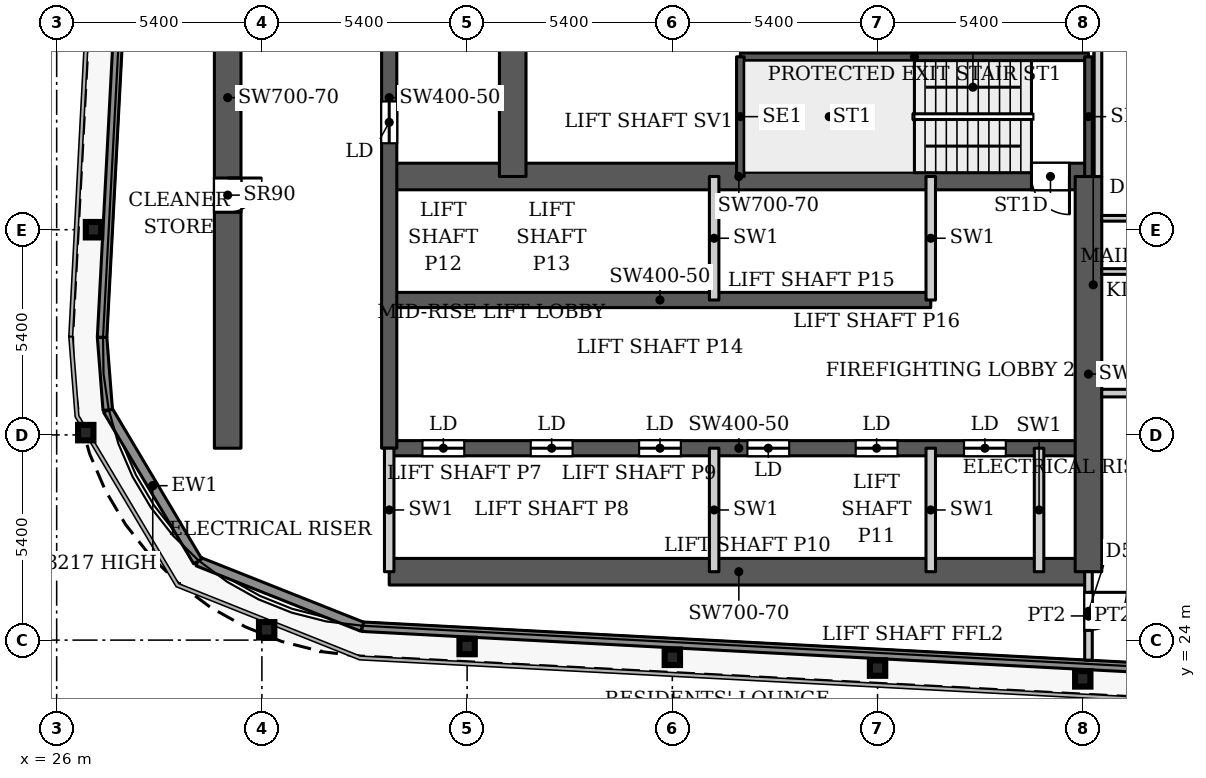
"""IFC4 building model, lengths in metres.
Left out: names, types, materials, properties, quantities, classifications, styles, units other than length and angle.
Written with IfcOpenShell. Run it as: python <this file> out.ifc"""

import sys

from ifc_helpers import new_model, si_unit, direction, frame, frame_2d, origin, origin_2d, place, context, subcontext, project, spatial, rectangle, i_section, extrude, source, transform, mapped, element, fill, save


model = new_model("IFC4")
c1 = context("Model", 3, precision=1e-05, world=origin(), true_north=direction((0.0, 1.0)))
c2 = subcontext(c1, "Body", "Model", "MODEL_VIEW")
j1 = project(units=[si_unit("LENGTHUNIT", "METRE"), si_unit("PLANEANGLEUNIT", "RADIAN")], contexts=[c1])
p1 = place(None, origin())
s1 = spatial("IfcSite", under=j1, at=p1, CompositionType="ELEMENT")
p2 = place(p1, origin())
s2 = spatial("IfcBuilding", under=s1, at=p2, CompositionType="ELEMENT")
p3 = place(p2, frame((0.0, 0.0, 220.1)))
s3 = spatial("IfcBuildingStorey", under=s2, at=p3, CompositionType="ELEMENT", Elevation=220.1)
for number, where, z_axis, x_axis in (
    (1, (53.0, 22.98, 0.0), (0.0, 0.0, 1.0), (1.0, 0.0, 0.0)),
    (2, (47.6, 23.264, 0.0), (0.0, 0.0, 1.0), (1.0, 0.0, 0.0)),
    (3, (42.2, 23.548, 0.0), (0.0, 0.0, 1.0), (1.0, 0.0, 0.0)),
    (4, (36.8, 23.832, 0.0), (0.0, 0.0, 1.0), (1.0, 0.0, 0.0)),
    (5, (31.526, 24.271, 0.0), (0.0, 0.0, 1.0), (1.0, 0.0, 0.0)),
    (6, (26.765, 29.46, 0.0), (0.0, 0.0, 1.0), (1.0, 0.0, 0.0)),
    (7, (26.969, 34.8, 0.0), (0.0, 0.0, 1.0), (1.0, 0.0, 0.0)),
):
    element("IfcColumn", number, at=place(p3, frame(where, z_axis=z_axis, x_axis=x_axis)), inside=s3, PredefinedType="COLUMN", context=c2, shape_type="SweptSolid", body=[
        extrude(i_section(OverallWidth=0.404, OverallDepth=0.407, WebThickness=0.027, FlangeThickness=0.044, FilletRadius=0.012, at=origin_2d()), origin(), (0.0, 0.0, 1.0), 3.9),
    ])
p4 = place(p3, frame((34.75, 25.8, 0.0), z_axis=(0.0, 0.0, 1.0), x_axis=(1.0, 0.0, 0.0)))
e8 = element("IfcWall", 8, at=p4, inside=s3, PredefinedType="SHEAR", context=c2, shape_type="SweptSolid", body=[
    extrude(rectangle(XDim=18.4, YDim=0.7, at=frame_2d((9.2, 0.0))), origin(), (0.0, 0.0, 1.0), 3.9),
])
p5 = place(p3, frame((34.75, 29.05, 0.0), z_axis=(0.0, 0.0, 1.0), x_axis=(1.0, 0.0, 0.0)))
e9 = element("IfcWall", 9, at=p5, inside=s3, PredefinedType="SHEAR", context=c2, shape_type="SweptSolid", body=[
    extrude(rectangle(XDim=18.4, YDim=0.4, at=frame_2d((9.2, 0.0))), origin(), (0.0, 0.0, 1.0), 3.9),
])
p6 = place(p5, frame((0.875, 0.0, 0.0)))
e10 = element("IfcOpeningElement", 10, at=p6, cuts=e9, PredefinedType="OPENING", context=c2, shape_type="SweptSolid", body=[
    extrude(rectangle(XDim=1.1, YDim=2.2, at=frame_2d((0.55, 1.1))), frame((0.0, 0.21, 0.0), z_axis=(0.0, -1.0, 0.0), x_axis=(1.0, 0.0, 0.0)), (0.0, 0.0, 1.0), 0.42),
])
p7 = place(p5, frame((3.725, 0.0, 0.0)))
e11 = element("IfcOpeningElement", 11, at=p7, cuts=e9, PredefinedType="OPENING", context=c2, shape_type="SweptSolid", body=[
    extrude(rectangle(XDim=1.1, YDim=2.2, at=frame_2d((0.55, 1.1))), frame((0.0, 0.21, 0.0), z_axis=(0.0, -1.0, 0.0), x_axis=(1.0, 0.0, 0.0)), (0.0, 0.0, 1.0), 0.42),
])
p8 = place(p5, frame((6.575, 0.0, 0.0)))
e12 = element("IfcOpeningElement", 12, at=p8, cuts=e9, PredefinedType="OPENING", context=c2, shape_type="SweptSolid", body=[
    extrude(rectangle(XDim=1.1, YDim=2.2, at=frame_2d((0.55, 1.1))), frame((0.0, 0.21, 0.0), z_axis=(0.0, -1.0, 0.0), x_axis=(1.0, 0.0, 0.0)), (0.0, 0.0, 1.0), 0.42),
])
p9 = place(p5, frame((9.425, 0.0, 0.0)))
e13 = element("IfcOpeningElement", 13, at=p9, cuts=e9, PredefinedType="OPENING", context=c2, shape_type="SweptSolid", body=[
    extrude(rectangle(XDim=1.1, YDim=2.2, at=frame_2d((0.55, 1.1))), frame((0.0, 0.21, 0.0), z_axis=(0.0, -1.0, 0.0), x_axis=(1.0, 0.0, 0.0)), (0.0, 0.0, 1.0), 0.42),
])
p10 = place(p5, frame((12.275, 0.0, 0.0)))
e14 = element("IfcOpeningElement", 14, at=p10, cuts=e9, PredefinedType="OPENING", context=c2, shape_type="SweptSolid", body=[
    extrude(rectangle(XDim=1.1, YDim=2.2, at=frame_2d((0.55, 1.1))), frame((0.0, 0.21, 0.0), z_axis=(0.0, -1.0, 0.0), x_axis=(1.0, 0.0, 0.0)), (0.0, 0.0, 1.0), 0.42),
])
p11 = place(p5, frame((15.125, 0.0, 0.0)))
e15 = element("IfcOpeningElement", 15, at=p11, cuts=e9, PredefinedType="OPENING", context=c2, shape_type="SweptSolid", body=[
    extrude(rectangle(XDim=1.1, YDim=2.2, at=frame_2d((0.55, 1.1))), frame((0.0, 0.21, 0.0), z_axis=(0.0, -1.0, 0.0), x_axis=(1.0, 0.0, 0.0)), (0.0, 0.0, 1.0), 0.42),
])
p12 = place(p3, frame((34.75, 32.95, 0.0), z_axis=(0.0, 0.0, 1.0), x_axis=(1.0, 0.0, 0.0)))
e16 = element("IfcWall", 16, at=p12, inside=s3, PredefinedType="SHEAR", context=c2, shape_type="SweptSolid", body=[
    extrude(rectangle(XDim=14.25, YDim=0.4, at=frame_2d((7.125, 0.0))), origin(), (0.0, 0.0, 1.0), 3.9),
])
p13 = place(p3, frame((34.75, 36.2, 0.0), z_axis=(0.0, 0.0, 1.0), x_axis=(1.0, 0.0, 0.0)))
e17 = element("IfcWall", 17, at=p13, inside=s3, PredefinedType="SHEAR", context=c2, shape_type="SweptSolid", body=[
    extrude(rectangle(XDim=18.4, YDim=0.7, at=frame_2d((9.2, 0.0))), origin(), (0.0, 0.0, 1.0), 3.9),
])
p14 = place(p13, frame((16.9, 0.0, 0.0)))
e18 = element("IfcOpeningElement", 18, at=p14, cuts=e17, PredefinedType="OPENING", context=c2, shape_type="SweptSolid", body=[
    extrude(rectangle(XDim=1.0, YDim=2.2, at=frame_2d((0.5, 1.1))), frame((0.0, 0.36, 0.0), z_axis=(0.0, -1.0, 0.0), x_axis=(1.0, 0.0, 0.0)), (0.0, 0.0, 1.0), 0.72),
])
p15 = place(p3, frame((34.75, 29.05, 0.0), z_axis=(0.0, 0.0, 1.0), x_axis=(0.0, 1.0, 0.0)))
e19 = element("IfcWall", 19, at=p15, inside=s3, PredefinedType="SHEAR", context=c2, shape_type="SweptSolid", body=[
    extrude(rectangle(XDim=18.45, YDim=0.4, at=frame_2d((9.225, 0.0))), origin(), (0.0, 0.0, 1.0), 3.9),
])
p16 = place(p15, frame((8.025, 0.0, 0.0)))
e20 = element("IfcOpeningElement", 20, at=p16, cuts=e19, PredefinedType="OPENING", context=c2, shape_type="SweptSolid", body=[
    extrude(rectangle(XDim=1.1, YDim=2.2, at=frame_2d((0.55, 1.1))), frame((0.0, 0.21, 0.0), z_axis=(0.0, -1.0, 0.0), x_axis=(1.0, 0.0, 0.0)), (0.0, 0.0, 1.0), 0.42),
])
p17 = place(p15, frame((10.875, 0.0, 0.0)))
e21 = element("IfcOpeningElement", 21, at=p17, cuts=e19, PredefinedType="OPENING", context=c2, shape_type="SweptSolid", body=[
    extrude(rectangle(XDim=1.1, YDim=2.2, at=frame_2d((0.55, 1.1))), frame((0.0, 0.21, 0.0), z_axis=(0.0, -1.0, 0.0), x_axis=(1.0, 0.0, 0.0)), (0.0, 0.0, 1.0), 0.42),
])
p18 = place(p15, frame((13.725, 0.0, 0.0)))
e22 = element("IfcOpeningElement", 22, at=p18, cuts=e19, PredefinedType="OPENING", context=c2, shape_type="SweptSolid", body=[
    extrude(rectangle(XDim=1.1, YDim=2.2, at=frame_2d((0.55, 1.1))), frame((0.0, 0.21, 0.0), z_axis=(0.0, -1.0, 0.0), x_axis=(1.0, 0.0, 0.0)), (0.0, 0.0, 1.0), 0.42),
])
p19 = place(p15, frame((15.95, 0.0, 0.0)))
e23 = element("IfcOpeningElement", 23, at=p19, cuts=e19, PredefinedType="OPENING", context=c2, shape_type="SweptSolid", body=[
    extrude(rectangle(XDim=1.1, YDim=2.2, at=frame_2d((0.55, 1.1))), frame((0.0, 0.21, 0.0), z_axis=(0.0, -1.0, 0.0), x_axis=(1.0, 0.0, 0.0)), (0.0, 0.0, 1.0), 0.42),
])
p20 = place(p3, frame((38.0, 36.2, 0.0), z_axis=(0.0, 0.0, 1.0), x_axis=(0.0, 1.0, 0.0)))
e24 = element("IfcWall", 24, at=p20, inside=s3, PredefinedType="SHEAR", context=c2, shape_type="SweptSolid", body=[
    extrude(rectangle(XDim=8.55, YDim=0.7, at=frame_2d((4.275, 0.0))), origin(), (0.0, 0.0, 1.0), 3.9),
])
p21 = place(p3, frame((30.5, 29.05, 0.0), z_axis=(0.0, 0.0, 1.0), x_axis=(0.0, 1.0, 0.0)))
e25 = element("IfcWall", 25, at=p21, inside=s3, PredefinedType="SHEAR", context=c2, shape_type="SweptSolid", body=[
    extrude(rectangle(XDim=18.45, YDim=0.7, at=frame_2d((9.225, 0.0))), origin(), (0.0, 0.0, 1.0), 3.9),
])
p22 = place(p21, frame((6.21, 0.0, 0.0)))
e26 = element("IfcOpeningElement", 26, at=p22, cuts=e25, PredefinedType="OPENING", context=c2, shape_type="SweptSolid", body=[
    extrude(rectangle(XDim=0.9, YDim=2.2, at=frame_2d((0.45, 1.1))), frame((0.0, 0.36, 0.0), z_axis=(0.0, -1.0, 0.0), x_axis=(1.0, 0.0, 0.0)), (0.0, 0.0, 1.0), 0.72),
])
p23 = place(p21, frame((10.684, 0.0, 0.0)))
e27 = element("IfcOpeningElement", 27, at=p23, cuts=e25, PredefinedType="OPENING", context=c2, shape_type="SweptSolid", body=[
    extrude(rectangle(XDim=0.9, YDim=2.2, at=frame_2d((0.45, 1.1))), frame((0.0, 0.36, 0.0), z_axis=(0.0, -1.0, 0.0), x_axis=(1.0, 0.0, 0.0)), (0.0, 0.0, 1.0), 0.72),
])
p24 = place(p3, frame((53.15, 25.8, 0.0), z_axis=(0.0, 0.0, 1.0), x_axis=(0.0, 1.0, 0.0)))
e28 = element("IfcWall", 28, at=p24, inside=s3, PredefinedType="SHEAR", context=c2, shape_type="SweptSolid", body=[
    extrude(rectangle(XDim=10.4, YDim=0.7, at=frame_2d((5.2, 0.0))), origin(), (0.0, 0.0, 1.0), 3.9),
])
p25 = place(p3, frame((84.386, 21.703, 0.0), z_axis=(0.0, 0.0, 1.0), x_axis=(-0.998617508267, 0.05256493302, 0.0)))
e29 = element("IfcWall", 29, at=p25, inside=s3, PredefinedType="SOLIDWALL", context=c2, shape_type="SweptSolid", body=[
    extrude(rectangle(XDim=50.417, YDim=0.25, at=frame_2d((25.208, 0.0))), origin(), (0.0, 0.0, 1.0), 3.75),
])
p26 = place(p3, frame((34.039, 24.353, 0.0), z_axis=(0.0, 0.0, 1.0), x_axis=(-0.929352825399, 0.369192803184, 0.0)))
e30 = element("IfcWall", 30, at=p26, inside=s3, PredefinedType="SOLIDWALL", context=c2, shape_type="SweptSolid", body=[
    extrude(rectangle(XDim=4.656, YDim=0.25, at=frame_2d((2.328, 0.0))), origin(), (0.0, 0.0, 1.0), 3.75),
])
p27 = place(p3, frame((29.712, 26.072, 0.0), z_axis=(0.0, 0.0, 1.0), x_axis=(-0.511028049012, 0.859564036662, 0.0)))
e31 = element("IfcWall", 31, at=p27, inside=s3, PredefinedType="SOLIDWALL", context=c2, shape_type="SweptSolid", body=[
    extrude(rectangle(XDim=4.634, YDim=0.25, at=frame_2d((2.317, 0.0))), origin(), (0.0, 0.0, 1.0), 3.217),
])
p28 = place(p3, frame((27.344, 30.055, 0.0), z_axis=(0.0, 0.0, 1.0), x_axis=(-0.077571675317, 0.99698677784, 0.0)))
e32 = element("IfcWall", 32, at=p28, inside=s3, PredefinedType="SOLIDWALL", context=c2, shape_type="SweptSolid", body=[
    extrude(rectangle(XDim=1.92, YDim=0.25, at=frame_2d((0.96, 0.0))), origin(), (0.0, 0.0, 1.0), 3.75),
])
p29 = place(p3, frame((27.195, 31.969, 0.0), z_axis=(0.0, 0.0, 1.0), x_axis=(0.052559748861, 0.998617781135, 0.0)))
e33 = element("IfcWall", 33, at=p29, inside=s3, PredefinedType="SOLIDWALL", context=c2, shape_type="SweptSolid", body=[
    extrude(rectangle(XDim=55.972, YDim=0.25, at=frame_2d((27.986, 0.0))), origin(), (0.0, 0.0, 1.0), 3.75),
])
p30 = place(p3, frame((43.99, 39.35, 0.0), z_axis=(0.0, 0.0, 1.0), x_axis=(1.0, 0.0, 0.0)))
e34 = element("IfcWall", 34, at=p30, inside=s3, PredefinedType="SHEAR", context=c2, shape_type="SweptSolid", body=[
    extrude(rectangle(XDim=9.16, YDim=0.2, at=frame_2d((4.58, 0.0))), origin(), (0.0, 0.0, 1.0), 3.9),
])
for number, where, z_axis, x_axis in (
    (35, (43.99, 36.2, 0.0), (0.0, 0.0, 1.0), (0.0, 1.0, 0.0)),
    (36, (53.15, 36.2, 0.0), (0.0, 0.0, 1.0), (0.0, 1.0, 0.0)),
):
    element("IfcWall", number, at=place(p3, frame(where, z_axis=z_axis, x_axis=x_axis)), inside=s3, PredefinedType="SHEAR", context=c2, shape_type="SweptSolid", body=[
        extrude(rectangle(XDim=3.15, YDim=0.2, at=frame_2d((1.575, 0.0))), origin(), (0.0, 0.0, 1.0), 3.9),
    ])
for number, where, z_axis, x_axis in (
    (37, (34.75, 25.8, 0.0), (0.0, 0.0, 1.0), (0.0, 1.0, 0.0)),
    (38, (43.3, 25.8, 0.0), (0.0, 0.0, 1.0), (0.0, 1.0, 0.0)),
    (39, (43.3, 32.95, 0.0), (0.0, 0.0, 1.0), (0.0, 1.0, 0.0)),
    (40, (49.0, 25.8, 0.0), (0.0, 0.0, 1.0), (0.0, 1.0, 0.0)),
    (41, (49.0, 32.95, 0.0), (0.0, 0.0, 1.0), (0.0, 1.0, 0.0)),
    (42, (51.85, 25.8, 0.0), (0.0, 0.0, 1.0), (0.0, 1.0, 0.0)),
):
    element("IfcWall", number, at=place(p3, frame(where, z_axis=z_axis, x_axis=x_axis)), inside=s3, PredefinedType="PARTITIONING", context=c2, shape_type="SweptSolid", body=[
        extrude(rectangle(XDim=3.25, YDim=0.25, at=frame_2d((1.625, 0.0))), origin(), (0.0, 0.0, 1.0), 3.9),
    ])
p31 = place(p3, frame((53.15, 23.472, 0.0), z_axis=(0.0, 0.0, 1.0), x_axis=(0.0, 1.0, 0.0)))
e43 = element("IfcWall", 43, at=p31, inside=s3, PredefinedType="PARTITIONING", context=c2, shape_type="SweptSolid", body=[
    extrude(rectangle(XDim=2.328, YDim=0.2, at=frame_2d((1.164, 0.0))), origin(), (0.0, 0.0, 1.0), 3.447),
])
p32 = place(p31, frame((0.785, 0.0, 0.0)))
e44 = element("IfcOpeningElement", 44, at=p32, cuts=e43, PredefinedType="OPENING", context=c2, shape_type="SweptSolid", body=[
    extrude(rectangle(XDim=1.0, YDim=2.1, at=frame_2d((0.5, 1.05))), frame((0.0, 0.11, 0.0), z_axis=(0.0, -1.0, 0.0), x_axis=(1.0, 0.0, 0.0)), (0.0, 0.0, 1.0), 0.22),
])
p33 = place(p3, frame((53.4, 36.199, 0.0), z_axis=(0.0, 0.0, 1.0), x_axis=(0.0, 1.0, 0.0)))
e45 = element("IfcWall", 45, at=p33, inside=s3, PredefinedType="PARTITIONING", context=c2, shape_type="SweptSolid", body=[
    extrude(rectangle(XDim=7.701, YDim=0.2, at=frame_2d((3.851, 0.0))), origin(), (0.0, 0.0, 1.0), 3.6),
])
p34 = place(p3, frame((53.499, 30.5, 0.0), z_axis=(0.0, 0.0, 1.0), x_axis=(1.0, 0.0, 0.0)))
e46 = element("IfcWall", 46, at=p34, inside=s3, PredefinedType="PARTITIONING", context=c2, shape_type="SweptSolid", body=[
    extrude(rectangle(XDim=28.401, YDim=0.2, at=frame_2d((14.2, 0.0))), origin(), (0.0, 0.0, 1.0), 3.6),
])
p35 = place(p34, frame((10.201, 0.0, 0.0)))
e47 = element("IfcOpeningElement", 47, at=p35, cuts=e46, PredefinedType="OPENING", context=c2, shape_type="SweptSolid", body=[
    extrude(rectangle(XDim=1.0, YDim=2.1, at=frame_2d((0.5, 1.05))), frame((0.0, 0.11, 0.0), z_axis=(0.0, -1.0, 0.0), x_axis=(1.0, 0.0, 0.0)), (0.0, 0.0, 1.0), 0.22),
])
p36 = place(p34, frame((12.151, 0.0, 0.0)))
e48 = element("IfcOpeningElement", 48, at=p36, cuts=e46, PredefinedType="OPENING", context=c2, shape_type="SweptSolid", body=[
    extrude(rectangle(XDim=1.0, YDim=2.1, at=frame_2d((0.5, 1.05))), frame((0.0, 0.11, 0.0), z_axis=(0.0, -1.0, 0.0), x_axis=(1.0, 0.0, 0.0)), (0.0, 0.0, 1.0), 0.22),
])
p37 = place(p34, frame((24.001, 0.0, 0.0)))
e49 = element("IfcOpeningElement", 49, at=p37, cuts=e46, PredefinedType="OPENING", context=c2, shape_type="SweptSolid", body=[
    extrude(rectangle(XDim=1.0, YDim=2.1, at=frame_2d((0.5, 1.05))), frame((0.0, 0.11, 0.0), z_axis=(0.0, -1.0, 0.0), x_axis=(1.0, 0.0, 0.0)), (0.0, 0.0, 1.0), 0.22),
])
p38 = place(p3, frame((53.499, 33.7, 0.0), z_axis=(0.0, 0.0, 1.0), x_axis=(1.0, 0.0, 0.0)))
e50 = element("IfcWall", 50, at=p38, inside=s3, PredefinedType="PARTITIONING", context=c2, shape_type="SweptSolid", body=[
    extrude(rectangle(XDim=9.876, YDim=0.15, at=frame_2d((4.938, 0.0))), origin(), (0.0, 0.0, 1.0), 3.6),
])
p39 = place(p38, frame((6.851, 0.0, 0.0)))
e51 = element("IfcOpeningElement", 51, at=p39, cuts=e50, PredefinedType="OPENING", context=c2, shape_type="SweptSolid", body=[
    extrude(rectangle(XDim=0.8, YDim=2.1, at=frame_2d((0.4, 1.05))), frame((0.0, 0.085, 0.0), z_axis=(0.0, -1.0, 0.0), x_axis=(1.0, 0.0, 0.0)), (0.0, 0.0, 1.0), 0.17),
])
p40 = place(p38, frame((0.851, 0.0, 0.0)))
e52 = element("IfcOpeningElement", 52, at=p40, cuts=e50, PredefinedType="OPENING", context=c2, shape_type="SweptSolid", body=[
    extrude(rectangle(XDim=0.9, YDim=2.1, at=frame_2d((0.45, 1.05))), frame((0.0, 0.085, 0.0), z_axis=(0.0, -1.0, 0.0), x_axis=(1.0, 0.0, 0.0)), (0.0, 0.0, 1.0), 0.17),
])
p41 = place(p38, frame((4.901, 0.0, 0.0)))
e53 = element("IfcOpeningElement", 53, at=p41, cuts=e50, PredefinedType="OPENING", context=c2, shape_type="SweptSolid", body=[
    extrude(rectangle(XDim=0.8, YDim=2.1, at=frame_2d((0.4, 1.05))), frame((0.0, 0.085, 0.0), z_axis=(0.0, -1.0, 0.0), x_axis=(1.0, 0.0, 0.0)), (0.0, 0.0, 1.0), 0.17),
])
p42 = place(p38, frame((8.651, 0.0, 0.0)))
e54 = element("IfcOpeningElement", 54, at=p42, cuts=e50, PredefinedType="OPENING", context=c2, shape_type="SweptSolid", body=[
    extrude(rectangle(XDim=0.8, YDim=2.1, at=frame_2d((0.4, 1.05))), frame((0.0, 0.085, 0.0), z_axis=(0.0, -1.0, 0.0), x_axis=(1.0, 0.0, 0.0)), (0.0, 0.0, 1.0), 0.17),
])
p43 = place(p3, frame((53.499, 35.1, 0.0), z_axis=(0.0, 0.0, 1.0), x_axis=(1.0, 0.0, 0.0)))
e55 = element("IfcWall", 55, at=p43, inside=s3, PredefinedType="PARTITIONING", context=c2, shape_type="SweptSolid", body=[
    extrude(rectangle(XDim=11.501, YDim=0.15, at=frame_2d((5.75, 0.0))), origin(), (0.0, 0.0, 1.0), 3.6),
])
p44 = place(p43, frame((5.001, 0.0, 0.0)))
e56 = element("IfcOpeningElement", 56, at=p44, cuts=e55, PredefinedType="OPENING", context=c2, shape_type="SweptSolid", body=[
    extrude(rectangle(XDim=0.9, YDim=2.1, at=frame_2d((0.45, 1.05))), frame((0.0, 0.085, 0.0), z_axis=(0.0, -1.0, 0.0), x_axis=(1.0, 0.0, 0.0)), (0.0, 0.0, 1.0), 0.17),
])
p45 = place(p43, frame((1.701, 0.0, 0.0)))
e57 = element("IfcOpeningElement", 57, at=p45, cuts=e55, PredefinedType="OPENING", context=c2, shape_type="SweptSolid", body=[
    extrude(rectangle(XDim=1.0, YDim=2.1, at=frame_2d((0.5, 1.05))), frame((0.0, 0.085, 0.0), z_axis=(0.0, -1.0, 0.0), x_axis=(1.0, 0.0, 0.0)), (0.0, 0.0, 1.0), 0.17),
])
p46 = place(p43, frame((7.701, 0.0, 0.0)))
e58 = element("IfcOpeningElement", 58, at=p46, cuts=e55, PredefinedType="OPENING", context=c2, shape_type="SweptSolid", body=[
    extrude(rectangle(XDim=0.9, YDim=2.1, at=frame_2d((0.45, 1.05))), frame((0.0, 0.085, 0.0), z_axis=(0.0, -1.0, 0.0), x_axis=(1.0, 0.0, 0.0)), (0.0, 0.0, 1.0), 0.17),
])
m1 = source(origin(), c2, "Body", "SweptSolid", [
    extrude(rectangle(XDim=1.1, YDim=2.2, at=frame_2d((0.55, 1.1))), frame((0.0, 0.025, 0.0), z_axis=(0.0, -1.0, 0.0), x_axis=(1.0, 0.0, 0.0)), (0.0, 0.0, 1.0), 0.05),
])
p47 = place(p6, origin())
e59 = element("IfcDoor", 59, at=p47, inside=s3, OperationType="SLIDING_TO_LEFT", PredefinedType="DOOR", context=c2, shape_type="MappedRepresentation", body=[
    mapped(m1, transform((0.0, 0.0, 0.0), x_axis=(1.0, 0.0, 0.0), y_axis=(0.0, 1.0, 0.0), z_axis=(0.0, 0.0, 1.0), scale=1.0)),
])
fill(e10, e59)
p48 = place(p7, origin())
e60 = element("IfcDoor", 60, at=p48, inside=s3, OperationType="SLIDING_TO_LEFT", PredefinedType="DOOR", context=c2, shape_type="MappedRepresentation", body=[
    mapped(m1, transform((0.0, 0.0, 0.0), x_axis=(1.0, 0.0, 0.0), y_axis=(0.0, 1.0, 0.0), z_axis=(0.0, 0.0, 1.0), scale=1.0)),
])
fill(e11, e60)
p49 = place(p8, origin())
e61 = element("IfcDoor", 61, at=p49, inside=s3, OperationType="SLIDING_TO_LEFT", PredefinedType="DOOR", context=c2, shape_type="MappedRepresentation", body=[
    mapped(m1, transform((0.0, 0.0, 0.0), x_axis=(1.0, 0.0, 0.0), y_axis=(0.0, 1.0, 0.0), z_axis=(0.0, 0.0, 1.0), scale=1.0)),
])
fill(e12, e61)
p50 = place(p9, origin())
e62 = element("IfcDoor", 62, at=p50, inside=s3, OperationType="SLIDING_TO_LEFT", PredefinedType="DOOR", context=c2, shape_type="MappedRepresentation", body=[
    mapped(m1, transform((0.0, 0.0, 0.0), x_axis=(1.0, 0.0, 0.0), y_axis=(0.0, 1.0, 0.0), z_axis=(0.0, 0.0, 1.0), scale=1.0)),
])
fill(e13, e62)
p51 = place(p10, origin())
e63 = element("IfcDoor", 63, at=p51, inside=s3, OperationType="SLIDING_TO_LEFT", PredefinedType="DOOR", context=c2, shape_type="MappedRepresentation", body=[
    mapped(m1, transform((0.0, 0.0, 0.0), x_axis=(1.0, 0.0, 0.0), y_axis=(0.0, 1.0, 0.0), z_axis=(0.0, 0.0, 1.0), scale=1.0)),
])
fill(e14, e63)
p52 = place(p16, origin())
e64 = element("IfcDoor", 64, at=p52, inside=s3, OperationType="SLIDING_TO_LEFT", PredefinedType="DOOR", context=c2, shape_type="MappedRepresentation", body=[
    mapped(m1, transform((0.0, 0.0, 0.0), x_axis=(1.0, 0.0, 0.0), y_axis=(0.0, 1.0, 0.0), z_axis=(0.0, 0.0, 1.0), scale=1.0)),
])
fill(e20, e64)
p53 = place(p11, origin())
e65 = element("IfcDoor", 65, at=p53, inside=s3, OperationType="SLIDING_TO_LEFT", PredefinedType="DOOR", context=c2, shape_type="MappedRepresentation", body=[
    mapped(m1, transform((0.0, 0.0, 0.0), x_axis=(1.0, 0.0, 0.0), y_axis=(0.0, 1.0, 0.0), z_axis=(0.0, 0.0, 1.0), scale=1.0)),
])
fill(e15, e65)
m2 = source(origin(), c2, "Body", "SweptSolid", [
    extrude(rectangle(XDim=0.9, YDim=2.2, at=frame_2d((0.45, 1.1))), frame((0.0, 0.025, 0.0), z_axis=(0.0, -1.0, 0.0), x_axis=(1.0, 0.0, 0.0)), (0.0, 0.0, 1.0), 0.05),
])
p54 = place(p22, origin())
e66 = element("IfcDoor", 66, at=p54, inside=s3, OperationType="SINGLE_SWING_RIGHT", PredefinedType="DOOR", context=c2, shape_type="MappedRepresentation", body=[
    mapped(m2, transform((0.0, 0.0, 0.0), x_axis=(1.0, 0.0, 0.0), y_axis=(0.0, 1.0, 0.0), z_axis=(0.0, 0.0, 1.0), scale=1.0)),
])
fill(e26, e66)
m3 = source(origin(), c2, "Body", "SweptSolid", [
    extrude(rectangle(XDim=1.0, YDim=2.2, at=frame_2d((0.5, 1.1))), frame((0.0, 0.025, 0.0), z_axis=(0.0, -1.0, 0.0), x_axis=(1.0, 0.0, 0.0)), (0.0, 0.0, 1.0), 0.05),
])
p55 = place(p14, origin())
e67 = element("IfcDoor", 67, at=p55, inside=s3, OperationType="SINGLE_SWING_RIGHT", PredefinedType="DOOR", context=c2, shape_type="MappedRepresentation", body=[
    mapped(m3, transform((0.0, 0.0, 0.0), x_axis=(1.0, 0.0, 0.0), y_axis=(0.0, 1.0, 0.0), z_axis=(0.0, 0.0, 1.0), scale=1.0)),
])
fill(e18, e67)
m4 = source(origin(), c2, "Body", "SweptSolid", [
    extrude(rectangle(XDim=1.0, YDim=2.1, at=frame_2d((0.5, 1.05))), frame((0.0, 0.025, 0.0), z_axis=(0.0, -1.0, 0.0), x_axis=(1.0, 0.0, 0.0)), (0.0, 0.0, 1.0), 0.05),
])
p56 = place(p32, origin())
e68 = element("IfcDoor", 68, at=p56, inside=s3, OperationType="SINGLE_SWING_RIGHT", PredefinedType="DOOR", context=c2, shape_type="MappedRepresentation", body=[
    mapped(m4, transform((0.0, 0.0, 0.0), x_axis=(1.0, 0.0, 0.0), y_axis=(0.0, 1.0, 0.0), z_axis=(0.0, 0.0, 1.0), scale=1.0)),
])
fill(e44, e68)
save(model, sys.argv[1])
